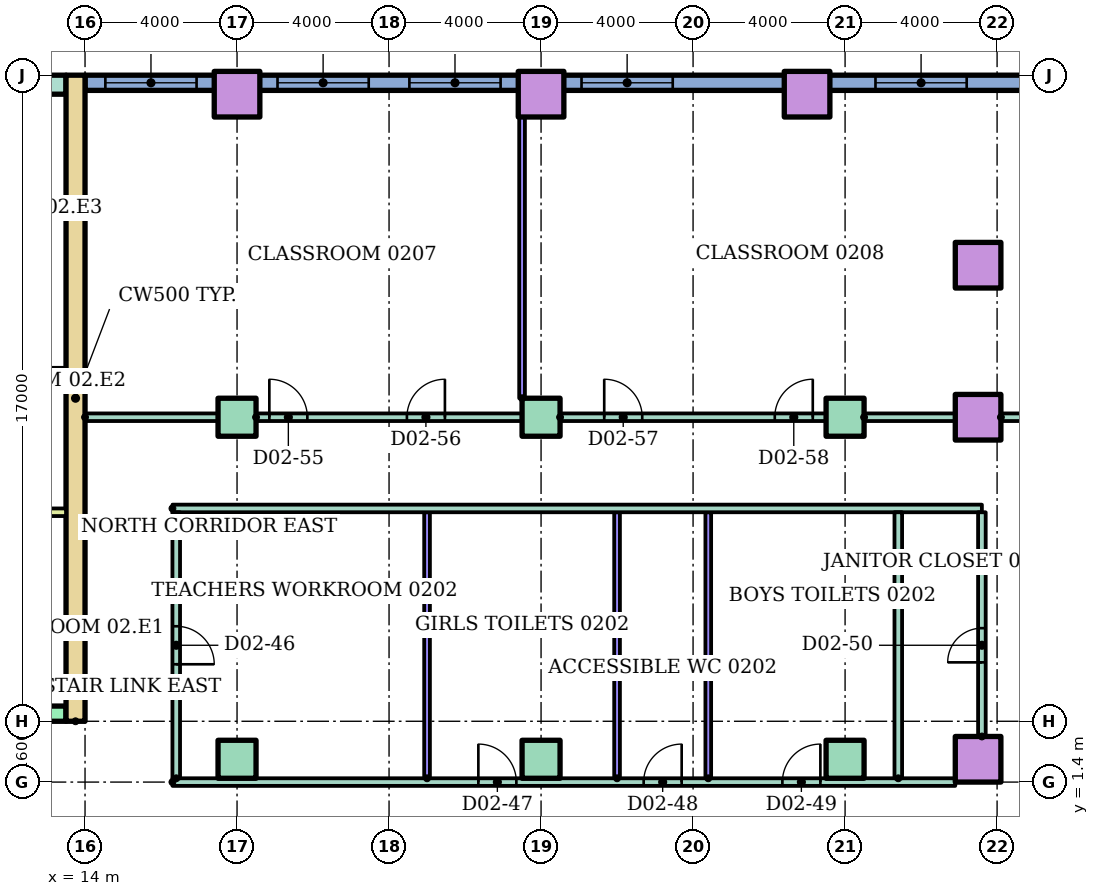
"""IFC4 building model, lengths in metres.
Left out: names, types, materials, properties, quantities, classifications, styles, units other than length and angle.
Written with IfcOpenShell. Run it as: python <this file> out.ifc"""

import sys

from ifc_helpers import new_model, si_unit, direction, frame, frame_2d, origin, origin_2d, place, context, subcontext, project, spatial, rectangle, hollow_rectangle, extrude, element, fill, save


model = new_model("IFC4")
c1 = context("Model", 3, precision=1e-05, world=origin(), true_north=direction((0.0, 1.0)))
c2 = subcontext(c1, "Body", "Model", "MODEL_VIEW")
j1 = project(units=[si_unit("LENGTHUNIT", "METRE"), si_unit("PLANEANGLEUNIT", "RADIAN")], contexts=[c1])
p1 = place(None, origin())
s1 = spatial("IfcSite", under=j1, at=p1, CompositionType="ELEMENT")
p2 = place(p1, origin())
s2 = spatial("IfcBuilding", under=s1, at=p2, CompositionType="ELEMENT")
p3 = place(p2, frame((0.0, 0.0, 10.0)))
s3 = spatial("IfcBuildingStorey", under=s2, at=p3, CompositionType="ELEMENT", Elevation=10.0)
for number, where in (
    (1, (18.0, 2.0, 0.0)),
    (2, (26.0, 2.0, 0.0)),
    (3, (34.0, 2.0, 0.0)),
):
    element("IfcColumn", number, at=place(p3, frame(where)), inside=s3, PredefinedType="COLUMN", context=c2, shape_type="SweptSolid", body=[
        extrude(rectangle(XDim=1.0, YDim=1.0, at=origin_2d()), origin(), (0.0, 0.0, 1.0), 4.0),
    ])
p4 = place(p3, frame((37.5, 2.0, 0.0)))
e4 = element("IfcColumn", 4, at=p4, inside=s3, PredefinedType="COLUMN", context=c2, shape_type="SweptSolid", body=[
    extrude(hollow_rectangle(XDim=1.2, YDim=1.2, WallThickness=0.06, at=origin_2d()), origin(), (0.0, 0.0, 1.0), 4.0),
])
for number, where in (
    (5, (18.0, 11.0, 0.0)),
    (6, (26.0, 11.0, 0.0)),
    (7, (34.0, 11.0, 0.0)),
):
    element("IfcColumn", number, at=place(p3, frame(where)), inside=s3, PredefinedType="COLUMN", context=c2, shape_type="SweptSolid", body=[
        extrude(rectangle(XDim=1.0, YDim=1.0, at=origin_2d()), origin(), (0.0, 0.0, 1.0), 4.0),
    ])
for number, where in (
    (8, (37.5, 11.0, 0.0)),
    (9, (37.5, 15.0, 0.0)),
    (10, (18.0, 19.5, 0.0)),
    (11, (26.0, 19.5, 0.0)),
    (12, (33.0, 19.5, 0.0)),
):
    element("IfcColumn", number, at=place(p3, frame(where)), inside=s3, PredefinedType="COLUMN", context=c2, shape_type="SweptSolid", body=[
        extrude(hollow_rectangle(XDim=1.2, YDim=1.2, WallThickness=0.06, at=origin_2d()), origin(), (0.0, 0.0, 1.0), 4.0),
    ])
p5 = place(p3, frame((39.6, 19.8, 0.0), z_axis=(0.0, 0.0, 1.0), x_axis=(-1.0, 0.0, 0.0)))
e13 = element("IfcWall", 13, at=p5, inside=s3, PredefinedType="STANDARD", context=c2, shape_type="SweptSolid", body=[
    extrude(rectangle(XDim=25.6, YDim=0.4, at=frame_2d((12.8, 0.0))), origin(), (0.0, 0.0, 1.0), 3.7),
])
p6 = place(p5, frame((2.4, 0.0, 0.9)))
e14 = element("IfcOpeningElement", 14, at=p6, cuts=e13, PredefinedType="OPENING", context=c2, shape_type="SweptSolid", body=[
    extrude(rectangle(XDim=2.4, YDim=2.1, at=frame_2d((1.2, 1.05))), frame((0.0, 0.21, 0.0), z_axis=(0.0, -1.0, 0.0), x_axis=(1.0, 0.0, 0.0)), (0.0, 0.0, 1.0), 0.42),
])
p7 = place(p5, frame((10.135, 0.0, 0.9)))
e15 = element("IfcOpeningElement", 15, at=p7, cuts=e13, PredefinedType="OPENING", context=c2, shape_type="SweptSolid", body=[
    extrude(rectangle(XDim=2.4, YDim=2.1, at=frame_2d((1.2, 1.05))), frame((0.0, 0.21, 0.0), z_axis=(0.0, -1.0, 0.0), x_axis=(1.0, 0.0, 0.0)), (0.0, 0.0, 1.0), 0.42),
])
p8 = place(p5, frame((14.665, 0.0, 0.9)))
e16 = element("IfcOpeningElement", 16, at=p8, cuts=e13, PredefinedType="OPENING", context=c2, shape_type="SweptSolid", body=[
    extrude(rectangle(XDim=2.4, YDim=2.1, at=frame_2d((1.2, 1.05))), frame((0.0, 0.21, 0.0), z_axis=(0.0, -1.0, 0.0), x_axis=(1.0, 0.0, 0.0)), (0.0, 0.0, 1.0), 0.42),
])
p9 = place(p5, frame((18.135, 0.0, 0.9)))
e17 = element("IfcOpeningElement", 17, at=p9, cuts=e13, PredefinedType="OPENING", context=c2, shape_type="SweptSolid", body=[
    extrude(rectangle(XDim=2.4, YDim=2.1, at=frame_2d((1.2, 1.05))), frame((0.0, 0.21, 0.0), z_axis=(0.0, -1.0, 0.0), x_axis=(1.0, 0.0, 0.0)), (0.0, 0.0, 1.0), 0.42),
])
p10 = place(p5, frame((22.665, 0.0, 0.9)))
e18 = element("IfcOpeningElement", 18, at=p10, cuts=e13, PredefinedType="OPENING", context=c2, shape_type="SweptSolid", body=[
    extrude(rectangle(XDim=2.4, YDim=2.1, at=frame_2d((1.2, 1.05))), frame((0.0, 0.21, 0.0), z_axis=(0.0, -1.0, 0.0), x_axis=(1.0, 0.0, 0.0)), (0.0, 0.0, 1.0), 0.42),
])
p11 = place(p3, frame((13.75, 3.0, 0.0), z_axis=(0.0, 0.0, 1.0), x_axis=(0.0, 1.0, 0.0)))
e19 = element("IfcWall", 19, at=p11, inside=s3, PredefinedType="SHEAR", context=c2, shape_type="SweptSolid", body=[
    extrude(rectangle(XDim=17.0, YDim=0.5, at=frame_2d((8.5, 0.0))), origin(), (0.0, 0.0, 1.0), 3.7),
])
p12 = place(p3, frame((-13.5, 19.75, 0.0)))
e20 = element("IfcWall", 20, at=p12, inside=s3, PredefinedType="SHEAR", context=c2, shape_type="SweptSolid", body=[
    extrude(rectangle(XDim=27.0, YDim=0.5, at=frame_2d((13.5, 0.0))), origin(), (0.0, 0.0, 1.0), 3.7),
])
p13 = place(p3, frame((-13.5, 3.2, 0.0)))
e21 = element("IfcWall", 21, at=p13, inside=s3, PredefinedType="SHEAR", context=c2, shape_type="SweptSolid", body=[
    extrude(rectangle(XDim=27.0, YDim=0.4, at=frame_2d((13.5, 0.0))), origin(), (0.0, 0.0, 1.0), 3.7),
])
p14 = place(p13, frame((6.861, 0.0, 0.0)))
e22 = element("IfcOpeningElement", 22, at=p14, cuts=e21, PredefinedType="OPENING", context=c2, shape_type="SweptSolid", body=[
    extrude(rectangle(XDim=1.1, YDim=2.1, at=frame_2d((0.55, 1.05))), frame((0.0, 0.21, 0.0), z_axis=(0.0, -1.0, 0.0), x_axis=(1.0, 0.0, 0.0)), (0.0, 0.0, 1.0), 0.42),
])
p15 = place(p13, frame((9.906, 0.0, 0.0)))
e23 = element("IfcOpeningElement", 23, at=p15, cuts=e21, PredefinedType="OPENING", context=c2, shape_type="SweptSolid", body=[
    extrude(rectangle(XDim=1.1, YDim=2.1, at=frame_2d((0.55, 1.05))), frame((0.0, 0.21, 0.0), z_axis=(0.0, -1.0, 0.0), x_axis=(1.0, 0.0, 0.0)), (0.0, 0.0, 1.0), 0.42),
])
p16 = place(p13, frame((15.994, 0.0, 0.0)))
e24 = element("IfcOpeningElement", 24, at=p16, cuts=e21, PredefinedType="OPENING", context=c2, shape_type="SweptSolid", body=[
    extrude(rectangle(XDim=1.1, YDim=2.1, at=frame_2d((0.55, 1.05))), frame((0.0, 0.21, 0.0), z_axis=(0.0, -1.0, 0.0), x_axis=(1.0, 0.0, 0.0)), (0.0, 0.0, 1.0), 0.42),
])
p17 = place(p13, frame((19.039, 0.0, 0.0)))
e25 = element("IfcOpeningElement", 25, at=p17, cuts=e21, PredefinedType="OPENING", context=c2, shape_type="SweptSolid", body=[
    extrude(rectangle(XDim=1.1, YDim=2.1, at=frame_2d((0.55, 1.05))), frame((0.0, 0.21, 0.0), z_axis=(0.0, -1.0, 0.0), x_axis=(1.0, 0.0, 0.0)), (0.0, 0.0, 1.0), 0.42),
])
p18 = place(p13, frame((12.6, 0.0, 0.0)))
e26 = element("IfcOpeningElement", 26, at=p18, cuts=e21, PredefinedType="OPENING", context=c2, shape_type="SweptSolid", body=[
    extrude(rectangle(XDim=1.8, YDim=2.1, at=frame_2d((0.9, 1.05))), frame((0.0, 0.21, 0.0), z_axis=(0.0, -1.0, 0.0), x_axis=(1.0, 0.0, 0.0)), (0.0, 0.0, 1.0), 0.42),
])
for number, where in (
    (27, (9.6, 8.5, 0.0)),
    (28, (9.6, 12.2, 0.0)),
):
    element("IfcWall", number, at=place(p3, frame(where)), inside=s3, PredefinedType="PARTITIONING", context=c2, shape_type="SweptSolid", body=[
        extrude(rectangle(XDim=3.9, YDim=0.2, at=frame_2d((1.95, 0.0))), origin(), (0.0, 0.0, 1.0), 3.7),
    ])
p19 = place(p3, frame((16.3, 1.4, 0.0)))
e29 = element("IfcWall", 29, at=p19, inside=s3, PredefinedType="PARTITIONING", context=c2, shape_type="SweptSolid", body=[
    extrude(rectangle(XDim=20.6, YDim=0.2, at=frame_2d((10.3, 0.0))), origin(), (0.0, 0.0, 1.0), 3.7),
])
p20 = place(p19, frame((8.05, 0.0, 0.0)))
e30 = element("IfcOpeningElement", 30, at=p20, cuts=e29, PredefinedType="OPENING", context=c2, shape_type="SweptSolid", body=[
    extrude(rectangle(XDim=1.0, YDim=2.1, at=frame_2d((0.5, 1.05))), frame((0.0, 0.11, 0.0), z_axis=(0.0, -1.0, 0.0), x_axis=(1.0, 0.0, 0.0)), (0.0, 0.0, 1.0), 0.22),
])
p21 = place(p19, frame((12.4, 0.0, 0.0)))
e31 = element("IfcOpeningElement", 31, at=p21, cuts=e29, PredefinedType="OPENING", context=c2, shape_type="SweptSolid", body=[
    extrude(rectangle(XDim=1.0, YDim=2.1, at=frame_2d((0.5, 1.05))), frame((0.0, 0.11, 0.0), z_axis=(0.0, -1.0, 0.0), x_axis=(1.0, 0.0, 0.0)), (0.0, 0.0, 1.0), 0.22),
])
p22 = place(p19, frame((16.05, 0.0, 0.0)))
e32 = element("IfcOpeningElement", 32, at=p22, cuts=e29, PredefinedType="OPENING", context=c2, shape_type="SweptSolid", body=[
    extrude(rectangle(XDim=1.0, YDim=2.1, at=frame_2d((0.5, 1.05))), frame((0.0, 0.11, 0.0), z_axis=(0.0, -1.0, 0.0), x_axis=(1.0, 0.0, 0.0)), (0.0, 0.0, 1.0), 0.22),
])
p23 = place(p3, frame((16.3, 8.6, 0.0)))
e33 = element("IfcWall", 33, at=p23, inside=s3, PredefinedType="PARTITIONING", context=c2, shape_type="SweptSolid", body=[
    extrude(rectangle(XDim=21.3, YDim=0.2, at=frame_2d((10.65, 0.0))), origin(), (0.0, 0.0, 1.0), 3.7),
])
p24 = place(p3, frame((14.0, 11.0, 0.0)))
e34 = element("IfcWall", 34, at=p24, inside=s3, PredefinedType="PARTITIONING", context=c2, shape_type="SweptSolid", body=[
    extrude(rectangle(XDim=3.5, YDim=0.2, at=frame_2d((1.75, 0.0))), origin(), (0.0, 0.0, 1.0), 3.7),
])
p25 = place(p3, frame((18.5, 11.0, 0.0)))
e35 = element("IfcWall", 35, at=p25, inside=s3, PredefinedType="PARTITIONING", context=c2, shape_type="SweptSolid", body=[
    extrude(rectangle(XDim=7.0, YDim=0.2, at=frame_2d((3.5, 0.0))), origin(), (0.0, 0.0, 1.0), 3.7),
])
p26 = place(p25, frame((0.35, 0.0, 0.0)))
e36 = element("IfcOpeningElement", 36, at=p26, cuts=e35, PredefinedType="OPENING", context=c2, shape_type="SweptSolid", body=[
    extrude(rectangle(XDim=1.0, YDim=2.1, at=frame_2d((0.5, 1.05))), frame((0.0, 0.11, 0.0), z_axis=(0.0, -1.0, 0.0), x_axis=(1.0, 0.0, 0.0)), (0.0, 0.0, 1.0), 0.22),
])
p27 = place(p25, frame((3.97, 0.0, 0.0)))
e37 = element("IfcOpeningElement", 37, at=p27, cuts=e35, PredefinedType="OPENING", context=c2, shape_type="SweptSolid", body=[
    extrude(rectangle(XDim=1.0, YDim=2.1, at=frame_2d((0.5, 1.05))), frame((0.0, 0.11, 0.0), z_axis=(0.0, -1.0, 0.0), x_axis=(1.0, 0.0, 0.0)), (0.0, 0.0, 1.0), 0.22),
])
p28 = place(p3, frame((26.5, 11.0, 0.0)))
e38 = element("IfcWall", 38, at=p28, inside=s3, PredefinedType="PARTITIONING", context=c2, shape_type="SweptSolid", body=[
    extrude(rectangle(XDim=7.0, YDim=0.2, at=frame_2d((3.5, 0.0))), origin(), (0.0, 0.0, 1.0), 3.7),
])
p29 = place(p28, frame((1.162, 0.0, 0.0)))
e39 = element("IfcOpeningElement", 39, at=p29, cuts=e38, PredefinedType="OPENING", context=c2, shape_type="SweptSolid", body=[
    extrude(rectangle(XDim=1.0, YDim=2.1, at=frame_2d((0.5, 1.05))), frame((0.0, 0.11, 0.0), z_axis=(0.0, -1.0, 0.0), x_axis=(1.0, 0.0, 0.0)), (0.0, 0.0, 1.0), 0.22),
])
p30 = place(p28, frame((5.65, 0.0, 0.0)))
e40 = element("IfcOpeningElement", 40, at=p30, cuts=e38, PredefinedType="OPENING", context=c2, shape_type="SweptSolid", body=[
    extrude(rectangle(XDim=1.0, YDim=2.1, at=frame_2d((0.5, 1.05))), frame((0.0, 0.11, 0.0), z_axis=(0.0, -1.0, 0.0), x_axis=(1.0, 0.0, 0.0)), (0.0, 0.0, 1.0), 0.22),
])
p31 = place(p3, frame((34.5, 11.0, 0.0)))
e41 = element("IfcWall", 41, at=p31, inside=s3, PredefinedType="PARTITIONING", context=c2, shape_type="SweptSolid", body=[
    extrude(rectangle(XDim=2.4, YDim=0.2, at=frame_2d((1.2, 0.0))), origin(), (0.0, 0.0, 1.0), 3.7),
])
p32 = place(p3, frame((38.1, 11.0, 0.0)))
e42 = element("IfcWall", 42, at=p32, inside=s3, PredefinedType="PARTITIONING", context=c2, shape_type="SweptSolid", body=[
    extrude(rectangle(XDim=1.5, YDim=0.2, at=frame_2d((0.75, 0.0))), origin(), (0.0, 0.0, 1.0), 3.7),
])
p33 = place(p3, frame((16.4, 1.5, 0.0), z_axis=(0.0, 0.0, 1.0), x_axis=(0.0, 1.0, 0.0)))
e43 = element("IfcWall", 43, at=p33, inside=s3, PredefinedType="PARTITIONING", context=c2, shape_type="SweptSolid", body=[
    extrude(rectangle(XDim=7.0, YDim=0.2, at=frame_2d((3.5, 0.0))), origin(), (0.0, 0.0, 1.0), 3.7),
])
p34 = place(p33, frame((3.0, 0.0, 0.0)))
e44 = element("IfcOpeningElement", 44, at=p34, cuts=e43, PredefinedType="OPENING", context=c2, shape_type="SweptSolid", body=[
    extrude(rectangle(XDim=1.0, YDim=2.1, at=frame_2d((0.5, 1.05))), frame((0.0, 0.11, 0.0), z_axis=(0.0, -1.0, 0.0), x_axis=(1.0, 0.0, 0.0)), (0.0, 0.0, 1.0), 0.22),
])
p35 = place(p3, frame((23.0, 1.5, 0.0), z_axis=(0.0, 0.0, 1.0), x_axis=(0.0, 1.0, 0.0)))
e45 = element("IfcWall", 45, at=p35, inside=s3, PredefinedType="PARTITIONING", context=c2, shape_type="SweptSolid", body=[
    extrude(rectangle(XDim=7.0, YDim=0.15, at=frame_2d((3.5, 0.0))), origin(), (0.0, 0.0, 1.0), 3.7),
])
p36 = place(p3, frame((25.5, 11.5, 0.0), z_axis=(0.0, 0.0, 1.0), x_axis=(0.0, 1.0, 0.0)))
e46 = element("IfcWall", 46, at=p36, inside=s3, PredefinedType="PARTITIONING", context=c2, shape_type="SweptSolid", body=[
    extrude(rectangle(XDim=7.4, YDim=0.15, at=frame_2d((3.7, 0.0))), origin(), (0.0, 0.0, 1.0), 3.7),
])
for number, where, z_axis, x_axis in (
    (47, (28.0, 1.5, 0.0), (0.0, 0.0, 1.0), (0.0, 1.0, 0.0)),
    (48, (30.4, 1.5, 0.0), (0.0, 0.0, 1.0), (0.0, 1.0, 0.0)),
):
    element("IfcWall", number, at=place(p3, frame(where, z_axis=z_axis, x_axis=x_axis)), inside=s3, PredefinedType="PARTITIONING", context=c2, shape_type="SweptSolid", body=[
        extrude(rectangle(XDim=7.0, YDim=0.15, at=frame_2d((3.5, 0.0))), origin(), (0.0, 0.0, 1.0), 3.7),
    ])
p37 = place(p3, frame((35.4, 1.5, 0.0), z_axis=(0.0, 0.0, 1.0), x_axis=(0.0, 1.0, 0.0)))
e49 = element("IfcWall", 49, at=p37, inside=s3, PredefinedType="PARTITIONING", context=c2, shape_type="SweptSolid", body=[
    extrude(rectangle(XDim=7.0, YDim=0.2, at=frame_2d((3.5, 0.0))), origin(), (0.0, 0.0, 1.0), 3.7),
])
p38 = place(p3, frame((37.6, 2.6, 0.0), z_axis=(0.0, 0.0, 1.0), x_axis=(0.0, 1.0, 0.0)))
e50 = element("IfcWall", 50, at=p38, inside=s3, PredefinedType="PARTITIONING", context=c2, shape_type="SweptSolid", body=[
    extrude(rectangle(XDim=5.9, YDim=0.2, at=frame_2d((2.95, 0.0))), origin(), (0.0, 0.0, 1.0), 3.7),
])
p39 = place(p38, frame((1.95, 0.0, 0.0)))
e51 = element("IfcOpeningElement", 51, at=p39, cuts=e50, PredefinedType="OPENING", context=c2, shape_type="SweptSolid", body=[
    extrude(rectangle(XDim=0.9, YDim=2.1, at=frame_2d((0.45, 1.05))), frame((0.0, 0.11, 0.0), z_axis=(0.0, -1.0, 0.0), x_axis=(1.0, 0.0, 0.0)), (0.0, 0.0, 1.0), 0.22),
])
p40 = place(p6, origin())
e52 = element("IfcWindow", 52, at=p40, inside=s3, PartitioningType="SINGLE_PANEL", PredefinedType="WINDOW", context=c2, shape_type="SweptSolid", body=[
    extrude(rectangle(XDim=2.4, YDim=2.1, at=frame_2d((1.2, 1.05))), frame((0.0, 0.03, 0.0), z_axis=(0.0, -1.0, 0.0), x_axis=(1.0, 0.0, 0.0)), (0.0, 0.0, 1.0), 0.06),
])
fill(e14, e52)
p41 = place(p7, origin())
e53 = element("IfcWindow", 53, at=p41, inside=s3, PartitioningType="SINGLE_PANEL", PredefinedType="WINDOW", context=c2, shape_type="SweptSolid", body=[
    extrude(rectangle(XDim=2.4, YDim=2.1, at=frame_2d((1.2, 1.05))), frame((0.0, 0.03, 0.0), z_axis=(0.0, -1.0, 0.0), x_axis=(1.0, 0.0, 0.0)), (0.0, 0.0, 1.0), 0.06),
])
fill(e15, e53)
p42 = place(p8, origin())
e54 = element("IfcWindow", 54, at=p42, inside=s3, PartitioningType="SINGLE_PANEL", PredefinedType="WINDOW", context=c2, shape_type="SweptSolid", body=[
    extrude(rectangle(XDim=2.4, YDim=2.1, at=frame_2d((1.2, 1.05))), frame((0.0, 0.03, 0.0), z_axis=(0.0, -1.0, 0.0), x_axis=(1.0, 0.0, 0.0)), (0.0, 0.0, 1.0), 0.06),
])
fill(e16, e54)
p43 = place(p9, origin())
e55 = element("IfcWindow", 55, at=p43, inside=s3, PartitioningType="SINGLE_PANEL", PredefinedType="WINDOW", context=c2, shape_type="SweptSolid", body=[
    extrude(rectangle(XDim=2.4, YDim=2.1, at=frame_2d((1.2, 1.05))), frame((0.0, 0.03, 0.0), z_axis=(0.0, -1.0, 0.0), x_axis=(1.0, 0.0, 0.0)), (0.0, 0.0, 1.0), 0.06),
])
fill(e17, e55)
p44 = place(p10, origin())
e56 = element("IfcWindow", 56, at=p44, inside=s3, PartitioningType="SINGLE_PANEL", PredefinedType="WINDOW", context=c2, shape_type="SweptSolid", body=[
    extrude(rectangle(XDim=2.4, YDim=2.1, at=frame_2d((1.2, 1.05))), frame((0.0, 0.03, 0.0), z_axis=(0.0, -1.0, 0.0), x_axis=(1.0, 0.0, 0.0)), (0.0, 0.0, 1.0), 0.06),
])
fill(e18, e56)
p45 = place(p34, frame((1.0, 0.0, 0.0), z_axis=(0.0, 0.0, 1.0), x_axis=(-1.0, 0.0, 0.0)))
e57 = element("IfcDoor", 57, at=p45, inside=s3, OperationType="SINGLE_SWING_LEFT", PredefinedType="DOOR", context=c2, shape_type="SweptSolid", body=[
    extrude(rectangle(XDim=1.0, YDim=2.1, at=frame_2d((0.5, 1.05))), frame((0.0, 0.025, 0.0), z_axis=(0.0, -1.0, 0.0), x_axis=(1.0, 0.0, 0.0)), (0.0, 0.0, 1.0), 0.05),
])
fill(e44, e57)
p46 = place(p20, origin())
e58 = element("IfcDoor", 58, at=p46, inside=s3, OperationType="SINGLE_SWING_LEFT", PredefinedType="DOOR", context=c2, shape_type="SweptSolid", body=[
    extrude(rectangle(XDim=1.0, YDim=2.1, at=frame_2d((0.5, 1.05))), frame((0.0, 0.025, 0.0), z_axis=(0.0, -1.0, 0.0), x_axis=(1.0, 0.0, 0.0)), (0.0, 0.0, 1.0), 0.05),
])
fill(e30, e58)
p47 = place(p21, origin())
e59 = element("IfcDoor", 59, at=p47, inside=s3, OperationType="SINGLE_SWING_RIGHT", PredefinedType="DOOR", context=c2, shape_type="SweptSolid", body=[
    extrude(rectangle(XDim=1.0, YDim=2.1, at=frame_2d((0.5, 1.05))), frame((0.0, 0.025, 0.0), z_axis=(0.0, -1.0, 0.0), x_axis=(1.0, 0.0, 0.0)), (0.0, 0.0, 1.0), 0.05),
])
fill(e31, e59)
p48 = place(p22, origin())
e60 = element("IfcDoor", 60, at=p48, inside=s3, OperationType="SINGLE_SWING_RIGHT", PredefinedType="DOOR", context=c2, shape_type="SweptSolid", body=[
    extrude(rectangle(XDim=1.0, YDim=2.1, at=frame_2d((0.5, 1.05))), frame((0.0, 0.025, 0.0), z_axis=(0.0, -1.0, 0.0), x_axis=(1.0, 0.0, 0.0)), (0.0, 0.0, 1.0), 0.05),
])
fill(e32, e60)
p49 = place(p39, origin())
e61 = element("IfcDoor", 61, at=p49, inside=s3, OperationType="SINGLE_SWING_LEFT", PredefinedType="DOOR", context=c2, shape_type="SweptSolid", body=[
    extrude(rectangle(XDim=0.9, YDim=2.1, at=frame_2d((0.45, 1.05))), frame((0.0, 0.025, 0.0), z_axis=(0.0, -1.0, 0.0), x_axis=(1.0, 0.0, 0.0)), (0.0, 0.0, 1.0), 0.05),
])
fill(e51, e61)
p50 = place(p26, origin())
e62 = element("IfcDoor", 62, at=p50, inside=s3, OperationType="SINGLE_SWING_LEFT", PredefinedType="DOOR", context=c2, shape_type="SweptSolid", body=[
    extrude(rectangle(XDim=1.0, YDim=2.1, at=frame_2d((0.5, 1.05))), frame((0.0, 0.025, 0.0), z_axis=(0.0, -1.0, 0.0), x_axis=(1.0, 0.0, 0.0)), (0.0, 0.0, 1.0), 0.05),
])
fill(e36, e62)
p51 = place(p27, origin())
e63 = element("IfcDoor", 63, at=p51, inside=s3, OperationType="SINGLE_SWING_RIGHT", PredefinedType="DOOR", context=c2, shape_type="SweptSolid", body=[
    extrude(rectangle(XDim=1.0, YDim=2.1, at=frame_2d((0.5, 1.05))), frame((0.0, 0.025, 0.0), z_axis=(0.0, -1.0, 0.0), x_axis=(1.0, 0.0, 0.0)), (0.0, 0.0, 1.0), 0.05),
])
fill(e37, e63)
p52 = place(p29, origin())
e64 = element("IfcDoor", 64, at=p52, inside=s3, OperationType="SINGLE_SWING_LEFT", PredefinedType="DOOR", context=c2, shape_type="SweptSolid", body=[
    extrude(rectangle(XDim=1.0, YDim=2.1, at=frame_2d((0.5, 1.05))), frame((0.0, 0.025, 0.0), z_axis=(0.0, -1.0, 0.0), x_axis=(1.0, 0.0, 0.0)), (0.0, 0.0, 1.0), 0.05),
])
fill(e39, e64)
p53 = place(p30, origin())
e65 = element("IfcDoor", 65, at=p53, inside=s3, OperationType="SINGLE_SWING_RIGHT", PredefinedType="DOOR", context=c2, shape_type="SweptSolid", body=[
    extrude(rectangle(XDim=1.0, YDim=2.1, at=frame_2d((0.5, 1.05))), frame((0.0, 0.025, 0.0), z_axis=(0.0, -1.0, 0.0), x_axis=(1.0, 0.0, 0.0)), (0.0, 0.0, 1.0), 0.05),
])
fill(e40, e65)
save(model, sys.argv[1])
